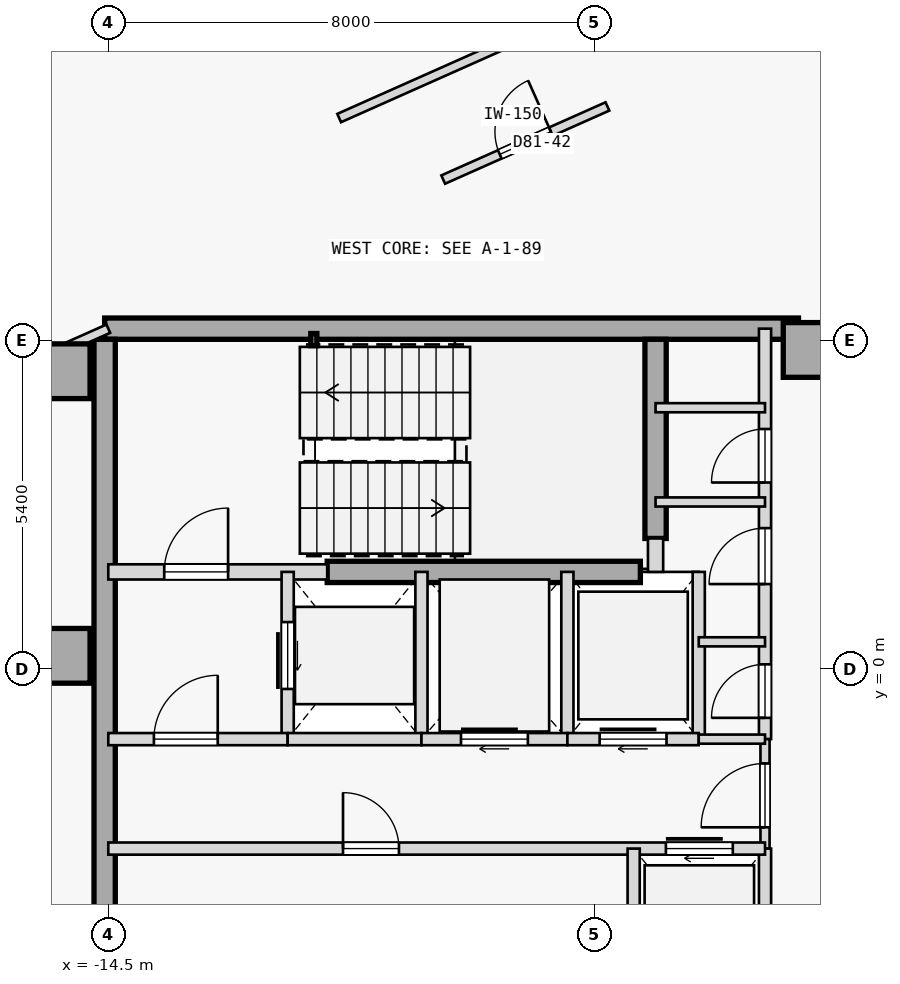
"""IFC4 building model, lengths in metres.
Left out: names, types, materials, properties, quantities, classifications, styles, units other than length and angle.
Written with IfcOpenShell. Run it as: python <this file> out.ifc"""

import sys

from ifc_helpers import new_model, si_unit, direction, frame, frame_2d, origin, origin_2d, place, context, subcontext, project, spatial, rectangle, hollow_rectangle, extrude, element, fill, save


model = new_model("IFC4")
c1 = context("Model", 3, precision=1e-05, world=origin(), true_north=direction((0.0, 1.0)))
c2 = subcontext(c1, "Body", "Model", "MODEL_VIEW")
j1 = project(units=[si_unit("LENGTHUNIT", "METRE"), si_unit("PLANEANGLEUNIT", "RADIAN")], contexts=[c1])
p1 = place(None, origin())
s1 = spatial("IfcSite", under=j1, at=p1, CompositionType="ELEMENT")
p2 = place(p1, origin())
s2 = spatial("IfcBuilding", under=s1, at=p2, CompositionType="ELEMENT")
p3 = place(p2, frame((0.0, 0.0, 302.0)))
s3 = spatial("IfcBuildingStorey", under=s2, at=p3, CompositionType="ELEMENT", Elevation=302.0)
for number, where, z_axis, x_axis in (
    (1, (-15.25, 4.9, 0.0), (0.0, 0.0, 1.0), (1.0, 0.0, 0.0)),
    (2, (-15.25, 0.22, 0.0), (0.0, 0.0, 1.0), (1.0, 0.0, 0.0)),
    (3, (-2.95, 5.25, 0.0), (0.0, 0.0, 1.0), (1.0, 0.0, 0.0)),
):
    element("IfcColumn", number, at=place(p3, frame(where, z_axis=z_axis, x_axis=x_axis)), inside=s3, PredefinedType="COLUMN", context=c2, shape_type="SweptSolid", body=[
        extrude(rectangle(XDim=0.9, YDim=0.9, at=origin_2d()), origin(), (0.0, 0.0, 1.0), 3.55),
    ])
p4 = place(p3, frame((-14.56, 5.6, 0.0), z_axis=(0.0, 0.0, 1.0), x_axis=(1.0, 0.0, 0.0)))
e4 = element("IfcWall", 4, at=p4, inside=s3, PredefinedType="SHEAR", context=c2, shape_type="SweptSolid", body=[
    extrude(rectangle(XDim=11.41, YDim=0.35, at=frame_2d((5.705, 0.0))), origin(), (0.0, 0.0, 1.0), 3.145),
])
p5 = place(p3, frame((-14.56, -5.425, 0.0), z_axis=(0.0, 0.0, 1.0), x_axis=(0.0, 1.0, 0.0)))
e5 = element("IfcWall", 5, at=p5, inside=s3, PredefinedType="SHEAR", context=c2, shape_type="SweptSolid", body=[
    extrude(rectangle(XDim=10.85, YDim=0.35, at=frame_2d((5.425, 0.0))), origin(), (0.0, 0.0, 1.0), 3.145),
])
p6 = place(p3, frame((-5.5, 2.15, 0.0), z_axis=(0.0, 0.0, 1.0), x_axis=(0.0, 1.0, 0.0)))
e6 = element("IfcWall", 6, at=p6, inside=s3, PredefinedType="SHEAR", context=c2, shape_type="SweptSolid", body=[
    extrude(rectangle(XDim=3.275, YDim=0.35, at=frame_2d((1.638, 0.0))), origin(), (0.0, 0.0, 1.0), 3.145),
])
p7 = place(p3, frame((-10.9, 1.6, 0.0), z_axis=(0.0, 0.0, 1.0), x_axis=(1.0, 0.0, 0.0)))
e7 = element("IfcWall", 7, at=p7, inside=s3, PredefinedType="SHEAR", context=c2, shape_type="SweptSolid", body=[
    extrude(rectangle(XDim=5.15, YDim=0.35, at=frame_2d((2.575, 0.0))), origin(), (0.0, 0.0, 1.0), 3.145),
])
p8 = place(p3, frame((-11.12, 5.42, 0.0), z_axis=(0.0, 0.0, 1.0), x_axis=(1.0, 0.0, 0.0)))
e8 = element("IfcColumn", 8, at=p8, inside=s3, PredefinedType="COLUMN", context=c2, shape_type="SweptSolid", body=[
    extrude(hollow_rectangle(XDim=0.1, YDim=0.2, WallThickness=0.008, at=origin_2d()), origin(), (0.0, 0.0, 1.0), 3.55),
])
p9 = place(p3, frame((-14.5, 1.6, 0.0), z_axis=(0.0, 0.0, 1.0), x_axis=(1.0, 0.0, 0.0)))
e9 = element("IfcWall", 9, at=p9, inside=s3, PredefinedType="STANDARD", context=c2, shape_type="SweptSolid", body=[
    extrude(rectangle(XDim=3.6, YDim=0.25, at=frame_2d((1.8, 0.0))), origin(), (0.0, 0.0, 1.0), 3.145),
])
p10 = place(p9, frame((0.92, 0.0, 0.0)))
e10 = element("IfcOpeningElement", 10, at=p10, cuts=e9, PredefinedType="OPENING", context=c2, shape_type="SweptSolid", body=[
    extrude(rectangle(XDim=1.05, YDim=2.15, at=frame_2d((0.525, 1.075))), frame((0.0, 0.135, 0.0), z_axis=(0.0, -1.0, 0.0), x_axis=(1.0, 0.0, 0.0)), (0.0, 0.0, 1.0), 0.27),
])
p11 = place(p3, frame((-5.5, 1.6, 0.0), z_axis=(0.0, 0.0, 1.0), x_axis=(0.0, 1.0, 0.0)))
e11 = element("IfcWall", 11, at=p11, inside=s3, PredefinedType="STANDARD", context=c2, shape_type="SweptSolid", body=[
    extrude(rectangle(XDim=0.55, YDim=0.25, at=frame_2d((0.275, 0.0))), origin(), (0.0, 0.0, 1.0), 3.145),
])
p12 = place(p3, frame((-3.7, -1.15, 0.0), z_axis=(0.0, 0.0, 1.0), x_axis=(0.0, 1.0, 0.0)))
e12 = element("IfcWall", 12, at=p12, inside=s3, PredefinedType="STANDARD", context=c2, shape_type="SweptSolid", body=[
    extrude(rectangle(XDim=6.75, YDim=0.2, at=frame_2d((3.375, 0.0))), origin(), (0.0, 0.0, 1.0), 3.145),
])
p13 = place(p12, frame((0.35, 0.0, 0.0)))
e13 = element("IfcOpeningElement", 13, at=p13, cuts=e12, PredefinedType="OPENING", context=c2, shape_type="SweptSolid", body=[
    extrude(rectangle(XDim=0.88, YDim=2.04, at=frame_2d((0.44, 1.02))), frame((0.0, 0.11, 0.0), z_axis=(0.0, -1.0, 0.0), x_axis=(1.0, 0.0, 0.0)), (0.0, 0.0, 1.0), 0.22),
])
p14 = place(p12, frame((2.55, 0.0, 0.0)))
e14 = element("IfcOpeningElement", 14, at=p14, cuts=e12, PredefinedType="OPENING", context=c2, shape_type="SweptSolid", body=[
    extrude(rectangle(XDim=0.92, YDim=2.04, at=frame_2d((0.46, 1.02))), frame((0.0, 0.11, 0.0), z_axis=(0.0, -1.0, 0.0), x_axis=(1.0, 0.0, 0.0)), (0.0, 0.0, 1.0), 0.22),
])
p15 = place(p12, frame((4.22, 0.0, 0.0)))
e15 = element("IfcOpeningElement", 15, at=p15, cuts=e12, PredefinedType="OPENING", context=c2, shape_type="SweptSolid", body=[
    extrude(rectangle(XDim=0.88, YDim=2.04, at=frame_2d((0.44, 1.02))), frame((0.0, 0.11, 0.0), z_axis=(0.0, -1.0, 0.0), x_axis=(1.0, 0.0, 0.0)), (0.0, 0.0, 1.0), 0.22),
])
p16 = place(p3, frame((-3.7, -2.95, 0.0), z_axis=(0.0, 0.0, 1.0), x_axis=(0.0, 1.0, 0.0)))
e16 = element("IfcWall", 16, at=p16, inside=s3, PredefinedType="PARTITIONING", context=c2, shape_type="SweptSolid", body=[
    extrude(rectangle(XDim=1.8, YDim=0.15, at=frame_2d((0.9, 0.0))), origin(), (0.0, 0.0, 1.0), 3.145),
])
p17 = place(p16, frame((0.35, 0.0, 0.0)))
e17 = element("IfcOpeningElement", 17, at=p17, cuts=e16, PredefinedType="OPENING", context=c2, shape_type="SweptSolid", body=[
    extrude(rectangle(XDim=1.05, YDim=2.18, at=frame_2d((0.525, 1.09))), frame((0.0, 0.085, 0.0), z_axis=(0.0, -1.0, 0.0), x_axis=(1.0, 0.0, 0.0)), (0.0, 0.0, 1.0), 0.17),
])
p18 = place(p3, frame((-3.7, -5.6, 0.0), z_axis=(0.0, 0.0, 1.0), x_axis=(0.0, 1.0, 0.0)))
e18 = element("IfcWall", 18, at=p18, inside=s3, PredefinedType="STANDARD", context=c2, shape_type="SweptSolid", body=[
    extrude(rectangle(XDim=2.65, YDim=0.2, at=frame_2d((1.325, 0.0))), origin(), (0.0, 0.0, 1.0), 3.145),
])
p19 = place(p3, frame((-11.55, -1.15, 0.0), z_axis=(0.0, 0.0, 1.0), x_axis=(0.0, 1.0, 0.0)))
e19 = element("IfcWall", 19, at=p19, inside=s3, PredefinedType="STANDARD", context=c2, shape_type="SweptSolid", body=[
    extrude(rectangle(XDim=2.75, YDim=0.2, at=frame_2d((1.375, 0.0))), origin(), (0.0, 0.0, 1.0), 3.145),
])
p20 = place(p19, frame((0.825, 0.0, 0.0)))
e20 = element("IfcOpeningElement", 20, at=p20, cuts=e19, PredefinedType="OPENING", context=c2, shape_type="SweptSolid", body=[
    extrude(rectangle(XDim=1.1, YDim=2.15, at=frame_2d((0.55, 1.075))), frame((0.0, 0.11, 0.0), z_axis=(0.0, -1.0, 0.0), x_axis=(1.0, 0.0, 0.0)), (0.0, 0.0, 1.0), 0.22),
])
p21 = place(p3, frame((-9.35, -1.15, 0.0), z_axis=(0.0, 0.0, 1.0), x_axis=(0.0, 1.0, 0.0)))
e21 = element("IfcWall", 21, at=p21, inside=s3, PredefinedType="STANDARD", context=c2, shape_type="SweptSolid", body=[
    extrude(rectangle(XDim=2.75, YDim=0.2, at=frame_2d((1.375, 0.0))), origin(), (0.0, 0.0, 1.0), 3.145),
])
p22 = place(p3, frame((-14.5, -1.15, 0.0), z_axis=(0.0, 0.0, 1.0), x_axis=(1.0, 0.0, 0.0)))
e22 = element("IfcWall", 22, at=p22, inside=s3, PredefinedType="STANDARD", context=c2, shape_type="SweptSolid", body=[
    extrude(rectangle(XDim=2.95, YDim=0.2, at=frame_2d((1.475, 0.0))), origin(), (0.0, 0.0, 1.0), 3.145),
])
p23 = place(p22, frame((0.75, 0.0, 0.0)))
e23 = element("IfcOpeningElement", 23, at=p23, cuts=e22, PredefinedType="OPENING", context=c2, shape_type="SweptSolid", body=[
    extrude(rectangle(XDim=1.05, YDim=2.18, at=frame_2d((0.525, 1.09))), frame((0.0, 0.11, 0.0), z_axis=(0.0, -1.0, 0.0), x_axis=(1.0, 0.0, 0.0)), (0.0, 0.0, 1.0), 0.22),
])
p24 = place(p3, frame((-11.55, -1.15, 0.0), z_axis=(0.0, 0.0, 1.0), x_axis=(1.0, 0.0, 0.0)))
e24 = element("IfcWall", 24, at=p24, inside=s3, PredefinedType="STANDARD", context=c2, shape_type="SweptSolid", body=[
    extrude(rectangle(XDim=2.2, YDim=0.2, at=frame_2d((1.1, 0.0))), origin(), (0.0, 0.0, 1.0), 3.145),
])
p25 = place(p3, frame((-6.95, -1.15, 0.0), z_axis=(0.0, 0.0, 1.0), x_axis=(0.0, 1.0, 0.0)))
e25 = element("IfcWall", 25, at=p25, inside=s3, PredefinedType="STANDARD", context=c2, shape_type="SweptSolid", body=[
    extrude(rectangle(XDim=2.75, YDim=0.2, at=frame_2d((1.375, 0.0))), origin(), (0.0, 0.0, 1.0), 3.145),
])
p26 = place(p3, frame((-9.35, -1.15, 0.0), z_axis=(0.0, 0.0, 1.0), x_axis=(1.0, 0.0, 0.0)))
e26 = element("IfcWall", 26, at=p26, inside=s3, PredefinedType="STANDARD", context=c2, shape_type="SweptSolid", body=[
    extrude(rectangle(XDim=2.4, YDim=0.2, at=frame_2d((1.2, 0.0))), origin(), (0.0, 0.0, 1.0), 3.145),
])
p27 = place(p26, frame((0.65, 0.0, 0.0)))
e27 = element("IfcOpeningElement", 27, at=p27, cuts=e26, PredefinedType="OPENING", context=c2, shape_type="SweptSolid", body=[
    extrude(rectangle(XDim=1.1, YDim=2.15, at=frame_2d((0.55, 1.075))), frame((0.0, 0.11, 0.0), z_axis=(0.0, -1.0, 0.0), x_axis=(1.0, 0.0, 0.0)), (0.0, 0.0, 1.0), 0.22),
])
p28 = place(p3, frame((-4.79, -1.15, 0.0), z_axis=(0.0, 0.0, 1.0), x_axis=(0.0, 1.0, 0.0)))
e28 = element("IfcWall", 28, at=p28, inside=s3, PredefinedType="STANDARD", context=c2, shape_type="SweptSolid", body=[
    extrude(rectangle(XDim=2.75, YDim=0.2, at=frame_2d((1.375, 0.0))), origin(), (0.0, 0.0, 1.0), 3.145),
])
p29 = place(p3, frame((-6.95, -1.15, 0.0), z_axis=(0.0, 0.0, 1.0), x_axis=(1.0, 0.0, 0.0)))
e29 = element("IfcWall", 29, at=p29, inside=s3, PredefinedType="STANDARD", context=c2, shape_type="SweptSolid", body=[
    extrude(rectangle(XDim=2.16, YDim=0.2, at=frame_2d((1.08, 0.0))), origin(), (0.0, 0.0, 1.0), 3.145),
])
p30 = place(p29, frame((0.53, 0.0, 0.0)))
e30 = element("IfcOpeningElement", 30, at=p30, cuts=e29, PredefinedType="OPENING", context=c2, shape_type="SweptSolid", body=[
    extrude(rectangle(XDim=1.1, YDim=2.15, at=frame_2d((0.55, 1.075))), frame((0.0, 0.11, 0.0), z_axis=(0.0, -1.0, 0.0), x_axis=(1.0, 0.0, 0.0)), (0.0, 0.0, 1.0), 0.22),
])
p31 = place(p3, frame((-4.79, -1.15, 0.0), z_axis=(0.0, 0.0, 1.0), x_axis=(1.0, 0.0, 0.0)))
e31 = element("IfcWall", 31, at=p31, inside=s3, PredefinedType="PARTITIONING", context=c2, shape_type="SweptSolid", body=[
    extrude(rectangle(XDim=1.09, YDim=0.15, at=frame_2d((0.545, 0.0))), origin(), (0.0, 0.0, 1.0), 3.145),
])
p32 = place(p3, frame((-14.5, -2.95, 0.0), z_axis=(0.0, 0.0, 1.0), x_axis=(1.0, 0.0, 0.0)))
e32 = element("IfcWall", 32, at=p32, inside=s3, PredefinedType="STANDARD", context=c2, shape_type="SweptSolid", body=[
    extrude(rectangle(XDim=10.8, YDim=0.2, at=frame_2d((5.4, 0.0))), origin(), (0.0, 0.0, 1.0), 3.145),
])
p33 = place(p32, frame((9.17, 0.0, 0.0)))
e33 = element("IfcOpeningElement", 33, at=p33, cuts=e32, PredefinedType="OPENING", context=c2, shape_type="SweptSolid", body=[
    extrude(rectangle(XDim=1.1, YDim=2.15, at=frame_2d((0.55, 1.075))), frame((0.0, 0.11, 0.0), z_axis=(0.0, -1.0, 0.0), x_axis=(1.0, 0.0, 0.0)), (0.0, 0.0, 1.0), 0.22),
])
p34 = place(p32, frame((3.86, 0.0, 0.0)))
e34 = element("IfcOpeningElement", 34, at=p34, cuts=e32, PredefinedType="OPENING", context=c2, shape_type="SweptSolid", body=[
    extrude(rectangle(XDim=0.92, YDim=2.04, at=frame_2d((0.46, 1.02))), frame((0.0, 0.11, 0.0), z_axis=(0.0, -1.0, 0.0), x_axis=(1.0, 0.0, 0.0)), (0.0, 0.0, 1.0), 0.22),
])
p35 = place(p3, frame((-5.86, -5.6, 0.0), z_axis=(0.0, 0.0, 1.0), x_axis=(0.0, 1.0, 0.0)))
e35 = element("IfcWall", 35, at=p35, inside=s3, PredefinedType="STANDARD", context=c2, shape_type="SweptSolid", body=[
    extrude(rectangle(XDim=2.65, YDim=0.2, at=frame_2d((1.325, 0.0))), origin(), (0.0, 0.0, 1.0), 3.145),
])
p36 = place(p3, frame((-5.5, 4.3, 0.0), z_axis=(0.0, 0.0, 1.0), x_axis=(1.0, 0.0, 0.0)))
e36 = element("IfcWall", 36, at=p36, inside=s3, PredefinedType="PARTITIONING", context=c2, shape_type="SweptSolid", body=[
    extrude(rectangle(XDim=1.8, YDim=0.15, at=frame_2d((0.9, 0.0))), origin(), (0.0, 0.0, 1.0), 3.145),
])
p37 = place(p3, frame((-4.79, 0.45, 0.0), z_axis=(0.0, 0.0, 1.0), x_axis=(1.0, 0.0, 0.0)))
e37 = element("IfcWall", 37, at=p37, inside=s3, PredefinedType="PARTITIONING", context=c2, shape_type="SweptSolid", body=[
    extrude(rectangle(XDim=1.09, YDim=0.15, at=frame_2d((0.545, 0.0))), origin(), (0.0, 0.0, 1.0), 3.145),
])
p38 = place(p3, frame((-5.5, 2.75, 0.0), z_axis=(0.0, 0.0, 1.0), x_axis=(1.0, 0.0, 0.0)))
e38 = element("IfcWall", 38, at=p38, inside=s3, PredefinedType="PARTITIONING", context=c2, shape_type="SweptSolid", body=[
    extrude(rectangle(XDim=1.8, YDim=0.15, at=frame_2d((0.9, 0.0))), origin(), (0.0, 0.0, 1.0), 3.145),
])
p39 = place(p3, frame((-10.703, 9.063, 0.0), z_axis=(0.0, 0.0, 1.0), x_axis=(0.913543802, 0.40674036169, 0.0)))
e39 = element("IfcWall", 39, at=p39, inside=s3, PredefinedType="PARTITIONING", context=c2, shape_type="SweptSolid", body=[
    extrude(rectangle(XDim=3.65, YDim=0.15, at=frame_2d((1.825, 0.0))), origin(), (0.0, 0.0, 1.0), 3.145),
])
p40 = place(p3, frame((-18.661, 3.747, 0.0), z_axis=(0.0, 0.0, 1.0), x_axis=(0.913535055583, 0.40676000568, 0.0)))
e40 = element("IfcWall", 40, at=p40, inside=s3, PredefinedType="PARTITIONING", context=c2, shape_type="SweptSolid", body=[
    extrude(rectangle(XDim=4.555, YDim=0.15, at=frame_2d((2.277, 0.0))), origin(), (0.0, 0.0, 1.0), 3.145),
])
p41 = place(p40, frame((1.134, 0.0, 0.0)))
e41 = element("IfcOpeningElement", 41, at=p41, cuts=e40, PredefinedType="OPENING", context=c2, shape_type="SweptSolid", body=[
    extrude(rectangle(XDim=0.92, YDim=2.04, at=frame_2d((0.46, 1.02))), frame((0.0, 0.085, 0.0), z_axis=(0.0, -1.0, 0.0), x_axis=(1.0, 0.0, 0.0)), (0.0, 0.0, 1.0), 0.17),
])
p42 = place(p3, frame((-8.992, 8.052, 0.0), z_axis=(0.0, 0.0, 1.0), x_axis=(0.913535467925, 0.406759079607, 0.0)))
e42 = element("IfcWall", 42, at=p42, inside=s3, PredefinedType="PARTITIONING", context=c2, shape_type="SweptSolid", body=[
    extrude(rectangle(XDim=2.956, YDim=0.15, at=frame_2d((1.478, 0.0))), origin(), (0.0, 0.0, 1.0), 3.145),
])
p43 = place(p42, frame((1.018, 0.0, 0.0)))
e43 = element("IfcOpeningElement", 43, at=p43, cuts=e42, PredefinedType="OPENING", context=c2, shape_type="SweptSolid", body=[
    extrude(rectangle(XDim=0.92, YDim=2.04, at=frame_2d((0.46, 1.02))), frame((0.0, 0.085, 0.0), z_axis=(0.0, -1.0, 0.0), x_axis=(1.0, 0.0, 0.0)), (0.0, 0.0, 1.0), 0.17),
])
p44 = place(p10, origin())
e44 = element("IfcDoor", 44, at=p44, inside=s3, OperationType="SINGLE_SWING_RIGHT", PredefinedType="DOOR", context=c2, shape_type="SweptSolid", body=[
    extrude(rectangle(XDim=1.05, YDim=2.15, at=frame_2d((0.525, 1.075))), frame((0.0, 0.025, 0.0), z_axis=(0.0, -1.0, 0.0), x_axis=(1.0, 0.0, 0.0)), (0.0, 0.0, 1.0), 0.05),
])
fill(e10, e44)
p45 = place(p23, origin())
e45 = element("IfcDoor", 45, at=p45, inside=s3, OperationType="SINGLE_SWING_RIGHT", PredefinedType="DOOR", context=c2, shape_type="SweptSolid", body=[
    extrude(rectangle(XDim=1.05, YDim=2.18, at=frame_2d((0.525, 1.09))), frame((0.0, 0.025, 0.0), z_axis=(0.0, -1.0, 0.0), x_axis=(1.0, 0.0, 0.0)), (0.0, 0.0, 1.0), 0.05),
])
fill(e23, e45)
p46 = place(p17, origin())
e46 = element("IfcDoor", 46, at=p46, inside=s3, OperationType="SINGLE_SWING_LEFT", PredefinedType="DOOR", context=c2, shape_type="SweptSolid", body=[
    extrude(rectangle(XDim=1.05, YDim=2.18, at=frame_2d((0.525, 1.09))), frame((0.0, 0.025, 0.0), z_axis=(0.0, -1.0, 0.0), x_axis=(1.0, 0.0, 0.0)), (0.0, 0.0, 1.0), 0.05),
])
fill(e17, e46)
p47 = place(p20, origin())
e47 = element("IfcDoor", 47, at=p47, inside=s3, OperationType="SLIDING_TO_RIGHT", PredefinedType="DOOR", context=c2, shape_type="SweptSolid", body=[
    extrude(rectangle(XDim=1.1, YDim=2.15, at=frame_2d((0.55, 1.075))), frame((0.0, 0.025, 0.0), z_axis=(0.0, -1.0, 0.0), x_axis=(1.0, 0.0, 0.0)), (0.0, 0.0, 1.0), 0.05),
])
fill(e20, e47)
p48 = place(p27, origin())
e48 = element("IfcDoor", 48, at=p48, inside=s3, OperationType="SLIDING_TO_RIGHT", PredefinedType="DOOR", context=c2, shape_type="SweptSolid", body=[
    extrude(rectangle(XDim=1.1, YDim=2.15, at=frame_2d((0.55, 1.075))), frame((0.0, 0.025, 0.0), z_axis=(0.0, -1.0, 0.0), x_axis=(1.0, 0.0, 0.0)), (0.0, 0.0, 1.0), 0.05),
])
fill(e27, e48)
p49 = place(p30, origin())
e49 = element("IfcDoor", 49, at=p49, inside=s3, OperationType="SLIDING_TO_RIGHT", PredefinedType="DOOR", context=c2, shape_type="SweptSolid", body=[
    extrude(rectangle(XDim=1.1, YDim=2.15, at=frame_2d((0.55, 1.075))), frame((0.0, 0.025, 0.0), z_axis=(0.0, -1.0, 0.0), x_axis=(1.0, 0.0, 0.0)), (0.0, 0.0, 1.0), 0.05),
])
fill(e30, e49)
p50 = place(p33, origin())
e50 = element("IfcDoor", 50, at=p50, inside=s3, OperationType="SLIDING_TO_RIGHT", PredefinedType="DOOR", context=c2, shape_type="SweptSolid", body=[
    extrude(rectangle(XDim=1.1, YDim=2.15, at=frame_2d((0.55, 1.075))), frame((0.0, 0.025, 0.0), z_axis=(0.0, -1.0, 0.0), x_axis=(1.0, 0.0, 0.0)), (0.0, 0.0, 1.0), 0.05),
])
fill(e33, e50)
p51 = place(p34, origin())
e51 = element("IfcDoor", 51, at=p51, inside=s3, OperationType="SINGLE_SWING_LEFT", PredefinedType="DOOR", context=c2, shape_type="SweptSolid", body=[
    extrude(rectangle(XDim=0.92, YDim=2.04, at=frame_2d((0.46, 1.02))), frame((0.0, 0.025, 0.0), z_axis=(0.0, -1.0, 0.0), x_axis=(1.0, 0.0, 0.0)), (0.0, 0.0, 1.0), 0.05),
])
fill(e34, e51)
p52 = place(p13, origin())
e52 = element("IfcDoor", 52, at=p52, inside=s3, OperationType="SINGLE_SWING_LEFT", PredefinedType="DOOR", context=c2, shape_type="SweptSolid", body=[
    extrude(rectangle(XDim=0.88, YDim=2.04, at=frame_2d((0.44, 1.02))), frame((0.0, 0.025, 0.0), z_axis=(0.0, -1.0, 0.0), x_axis=(1.0, 0.0, 0.0)), (0.0, 0.0, 1.0), 0.05),
])
fill(e13, e52)
p53 = place(p14, origin())
e53 = element("IfcDoor", 53, at=p53, inside=s3, OperationType="SINGLE_SWING_LEFT", PredefinedType="DOOR", context=c2, shape_type="SweptSolid", body=[
    extrude(rectangle(XDim=0.92, YDim=2.04, at=frame_2d((0.46, 1.02))), frame((0.0, 0.025, 0.0), z_axis=(0.0, -1.0, 0.0), x_axis=(1.0, 0.0, 0.0)), (0.0, 0.0, 1.0), 0.05),
])
fill(e14, e53)
p54 = place(p15, origin())
e54 = element("IfcDoor", 54, at=p54, inside=s3, OperationType="SINGLE_SWING_LEFT", PredefinedType="DOOR", context=c2, shape_type="SweptSolid", body=[
    extrude(rectangle(XDim=0.88, YDim=2.04, at=frame_2d((0.44, 1.02))), frame((0.0, 0.025, 0.0), z_axis=(0.0, -1.0, 0.0), x_axis=(1.0, 0.0, 0.0)), (0.0, 0.0, 1.0), 0.05),
])
fill(e15, e54)
p55 = place(p43, origin())
e55 = element("IfcDoor", 55, at=p55, inside=s3, OperationType="SINGLE_SWING_RIGHT", PredefinedType="DOOR", context=c2, shape_type="SweptSolid", body=[
    extrude(rectangle(XDim=0.92, YDim=2.04, at=frame_2d((0.46, 1.02))), frame((0.0, 0.025, 0.0), z_axis=(0.0, -1.0, 0.0), x_axis=(1.0, 0.0, 0.0)), (0.0, 0.0, 1.0), 0.05),
])
fill(e43, e55)
save(model, sys.argv[1])
